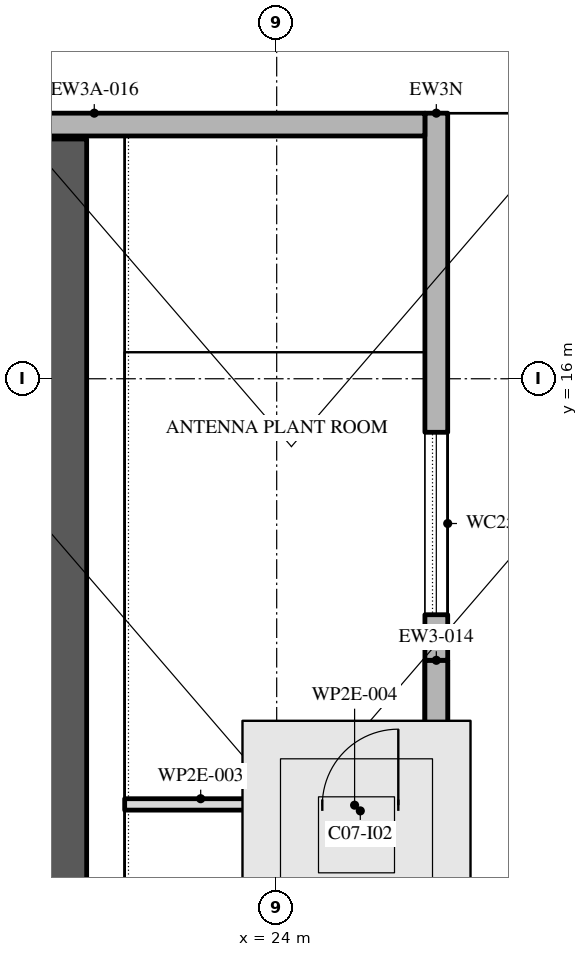
"""IFC4 building model, lengths in metres.
Left out: names, types, materials, properties, quantities, classifications, styles, units other than length and angle.
Written with IfcOpenShell. Run it as: python <this file> out.ifc"""

import sys

from ifc_helpers import new_model, si_unit, direction, frame, frame_2d, origin, place, context, subcontext, project, spatial, polyline, rectangle, outline, extrude, element, fill, save


model = new_model("IFC4")
c1 = context("Model", 3, precision=1e-05, world=origin(), true_north=direction((0.0, 1.0)))
c2 = subcontext(c1, "Body", "Model", "MODEL_VIEW")
j1 = project(units=[si_unit("LENGTHUNIT", "METRE"), si_unit("PLANEANGLEUNIT", "RADIAN")], contexts=[c1])
p1 = place(None, origin())
s1 = spatial("IfcSite", under=j1, at=p1, CompositionType="ELEMENT")
p2 = place(p1, origin())
s2 = spatial("IfcBuilding", under=s1, at=p2, CompositionType="ELEMENT")
p3 = place(p2, frame((0.0, 0.0, 394.2)))
s3 = spatial("IfcBuildingStorey", under=s2, at=p3, CompositionType="ELEMENT", Elevation=394.2)
p4 = place(p3, frame((26.1, 5.098, 0.0), z_axis=(0.0, 0.0, 1.0), x_axis=(0.0, 1.0, 0.0)))
e1 = element("IfcWall", 1, at=p4, inside=s3, PredefinedType="STANDARD", context=c2, shape_type="SweptSolid", body=[
    extrude(rectangle(XDim=7.198, YDim=0.3, at=frame_2d((3.599, 0.0))), origin(), (0.0, 0.0, 1.0), 4.0),
])
p5 = place(p4, frame((0.6, 0.0, 0.8)))
e2 = element("IfcOpeningElement", 2, at=p5, cuts=e1, PredefinedType="OPENING", context=c2, shape_type="SweptSolid", body=[
    extrude(outline(polyline([(0.0, 0.0), (2.4, 0.0), (2.4, 1.25), (2.377, 1.488), (2.31, 1.717), (2.2, 1.929), (2.051, 2.116), (1.87, 2.272), (1.663, 2.391), (1.437, 2.468), (1.2, 2.5), (0.963, 2.468), (0.737, 2.391), (0.53, 2.272), (0.349, 2.116), (0.2, 1.929), (0.09, 1.717), (0.023, 1.488), (0.0, 1.25), (0.0, 0.0)])), frame((0.0, 0.16, 0.0), z_axis=(0.0, -1.0, 0.0), x_axis=(1.0, 0.0, 0.0)), (0.0, 0.0, 1.0), 0.32),
])
p6 = place(p3, frame((26.1, 5.098, 4.0), z_axis=(0.0, 0.0, 1.0), x_axis=(0.0, 1.0, 0.0)))
e3 = element("IfcWall", 3, at=p6, inside=s3, PredefinedType="STANDARD", context=c2, shape_type="SweptSolid", body=[
    extrude(outline(polyline([(0.0, 0.0), (7.198, 0.0), (7.198, 2.954), (0.0, 7.809), (0.0, 0.0)])), frame((0.0, 0.15, 0.0), z_axis=(0.0, -1.0, 0.0), x_axis=(1.0, 0.0, 0.0)), (0.0, 0.0, 1.0), 0.3),
])
p7 = place(p6, frame((0.6, 0.0, 0.8)))
e4 = element("IfcOpeningElement", 4, at=p7, cuts=e3, PredefinedType="OPENING", context=c2, shape_type="SweptSolid", body=[
    extrude(outline(polyline([(0.0, 0.0), (2.4, 0.0), (2.4, 1.75), (2.379, 2.031), (2.316, 2.305), (2.212, 2.567), (2.071, 2.811), (1.895, 3.031), (1.688, 3.221), (1.454, 3.379), (1.2, 3.5), (0.946, 3.379), (0.712, 3.221), (0.505, 3.031), (0.329, 2.811), (0.188, 2.567), (0.084, 2.305), (0.021, 2.031), (0.0, 1.75), (0.0, 0.0)])), frame((0.0, 0.16, 0.0), z_axis=(0.0, -1.0, 0.0), x_axis=(1.0, 0.0, 0.0)), (0.0, 0.0, 1.0), 0.32),
])
p8 = place(p3, frame((26.1, 12.296, 0.0), z_axis=(0.0, 0.0, 1.0), x_axis=(0.0, 1.0, 0.0)))
e5 = element("IfcWall", 5, at=p8, inside=s3, PredefinedType="STANDARD", context=c2, shape_type="SweptSolid", body=[
    extrude(outline(polyline([(0.0, 0.0), (7.198, 0.0), (7.198, 2.098), (4.379, 4.0), (0.0, 4.0), (0.0, 0.0)])), frame((0.0, 0.15, 0.0), z_axis=(0.0, -1.0, 0.0), x_axis=(1.0, 0.0, 0.0)), (0.0, 0.0, 1.0), 0.3),
])
p9 = place(p8, frame((0.6, 0.0, 0.8)))
e6 = element("IfcOpeningElement", 6, at=p9, cuts=e5, PredefinedType="OPENING", context=c2, shape_type="SweptSolid", body=[
    extrude(outline(polyline([(0.0, 0.0), (2.4, 0.0), (2.4, 1.25), (2.377, 1.488), (2.31, 1.717), (2.2, 1.929), (2.051, 2.116), (1.87, 2.272), (1.663, 2.391), (1.437, 2.468), (1.2, 2.5), (0.963, 2.468), (0.737, 2.391), (0.53, 2.272), (0.349, 2.116), (0.2, 1.929), (0.09, 1.717), (0.023, 1.488), (0.0, 1.25), (0.0, 0.0)])), frame((0.0, 0.16, 0.0), z_axis=(0.0, -1.0, 0.0), x_axis=(1.0, 0.0, 0.0)), (0.0, 0.0, 1.0), 0.32),
])
p10 = place(p3, frame((25.95, 19.344, 0.0), z_axis=(0.0, 0.0, 1.0), x_axis=(-1.0, 0.0, 0.0)))
e7 = element("IfcWall", 7, at=p10, inside=s3, PredefinedType="STANDARD", context=c2, shape_type="SweptSolid", body=[
    extrude(rectangle(XDim=8.7, YDim=0.3, at=frame_2d((4.35, 0.0))), origin(), (0.0, 0.0, 1.0), 2.2),
])
p11 = place(p3, frame((21.25, -2.45, 0.0), z_axis=(0.0, 0.0, 1.0), x_axis=(0.0, 1.0, 0.0)))
e8 = element("IfcWall", 8, at=p11, inside=s3, PredefinedType="SHEAR", context=c2, shape_type="SweptSolid", body=[
    extrude(outline(polyline([(0.0, 0.0), (21.604, 0.0), (21.604, 0.754), (16.939, 3.9), (0.0, 3.9), (0.0, 0.0)])), frame((0.0, 0.25, 0.0), z_axis=(0.0, -1.0, 0.0), x_axis=(1.0, 0.0, 0.0)), (0.0, 0.0, 1.0), 0.5),
])
p12 = place(p11, frame((5.05, 0.0, 0.0)))
e9 = element("IfcOpeningElement", 9, at=p12, cuts=e8, PredefinedType="OPENING", context=c2, shape_type="SweptSolid", body=[
    extrude(rectangle(XDim=1.2, YDim=2.1, at=frame_2d((0.6, 1.05))), frame((0.0, 0.26, 0.0), z_axis=(0.0, -1.0, 0.0), x_axis=(1.0, 0.0, 0.0)), (0.0, 0.0, 1.0), 0.52),
])
p13 = place(p3, frame((22.0, 10.4, 0.0), z_axis=(0.0, 0.0, 1.0), x_axis=(1.0, 0.0, 0.0)))
e10 = element("IfcWall", 10, at=p13, inside=s3, PredefinedType="PARTITIONING", context=c2, shape_type="SweptSolid", body=[
    extrude(rectangle(XDim=2.0, YDim=0.15, at=frame_2d((1.0, 0.0))), origin(), (0.0, 0.0, 1.0), 3.9),
])
p14 = place(p3, frame((24.0, 10.39, 0.0), z_axis=(0.0, 0.0, 1.0), x_axis=(1.0, 0.0, 0.0)))
e11 = element("IfcWall", 11, at=p14, inside=s3, PredefinedType="PARTITIONING", context=c2, shape_type="SweptSolid", body=[
    extrude(rectangle(XDim=2.05, YDim=0.15, at=frame_2d((1.025, 0.0))), origin(), (0.0, 0.0, 1.0), 3.9),
])
p15 = place(p14, frame((0.6, 0.0, 0.0)))
e12 = element("IfcOpeningElement", 12, at=p15, cuts=e11, PredefinedType="OPENING", context=c2, shape_type="SweptSolid", body=[
    extrude(rectangle(XDim=1.0, YDim=2.1, at=frame_2d((0.5, 1.05))), frame((0.0, 0.085, 0.0), z_axis=(0.0, -1.0, 0.0), x_axis=(1.0, 0.0, 0.0)), (0.0, 0.0, 1.0), 0.17),
])
p16 = place(p9, origin())
e13 = element("IfcWindow", 13, at=p16, inside=s3, PartitioningType="DOUBLE_PANEL_VERTICAL", PredefinedType="WINDOW", context=c2, shape_type="SweptSolid", body=[
    extrude(outline(polyline([(0.0, 0.0), (2.4, 0.0), (2.4, 1.25), (2.377, 1.488), (2.31, 1.717), (2.2, 1.929), (2.051, 2.116), (1.87, 2.272), (1.663, 2.391), (1.437, 2.468), (1.2, 2.5), (0.963, 2.468), (0.737, 2.391), (0.53, 2.272), (0.349, 2.116), (0.2, 1.929), (0.09, 1.717), (0.023, 1.488), (0.0, 1.25), (0.0, 0.0)])), frame((0.0, 0.03, 0.0), z_axis=(0.0, -1.0, 0.0), x_axis=(1.0, 0.0, 0.0)), (0.0, 0.0, 1.0), 0.06),
])
fill(e6, e13)
p17 = place(p15, origin())
e14 = element("IfcDoor", 14, at=p17, inside=s3, OperationType="SINGLE_SWING_LEFT", PredefinedType="DOOR", context=c2, shape_type="SweptSolid", body=[
    extrude(rectangle(XDim=1.0, YDim=2.1, at=frame_2d((0.5, 1.05))), frame((0.0, 0.025, 0.0), z_axis=(0.0, -1.0, 0.0), x_axis=(1.0, 0.0, 0.0)), (0.0, 0.0, 1.0), 0.05),
])
fill(e12, e14)
save(model, sys.argv[1])
